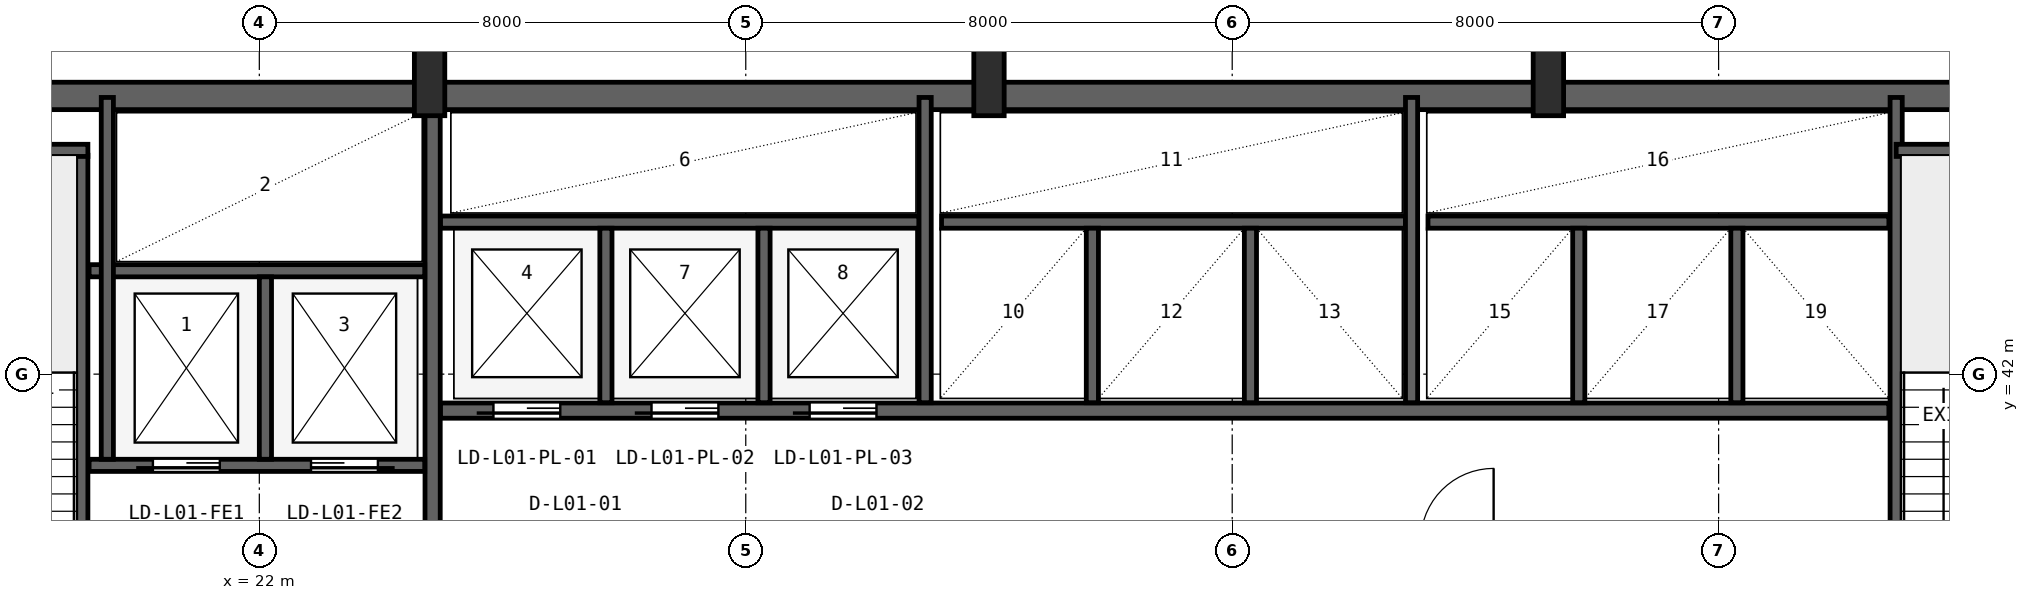
"""IFC4 building model, lengths in metres.
Left out: names, types, materials, properties, quantities, classifications, styles, units other than length and angle.
Written with IfcOpenShell. Run it as: python <this file> out.ifc"""

import sys

from ifc_helpers import new_model, si_unit, direction, frame, frame_2d, origin, origin_2d, place, context, subcontext, project, spatial, rectangle, i_section, extrude, source, transform, mapped, element, fill, save


model = new_model("IFC4")
c1 = context("Model", 3, precision=1e-05, world=origin(), true_north=direction((0.0, 1.0)))
c2 = subcontext(c1, "Body", "Model", "MODEL_VIEW")
j1 = project(units=[si_unit("LENGTHUNIT", "METRE"), si_unit("PLANEANGLEUNIT", "RADIAN")], contexts=[c1])
p1 = place(None, origin())
s1 = spatial("IfcSite", under=j1, at=p1, CompositionType="ELEMENT")
p2 = place(p1, origin())
s2 = spatial("IfcBuilding", under=s1, at=p2, CompositionType="ELEMENT")
p3 = place(p2, frame((0.0, 0.0, 6.0)))
s3 = spatial("IfcBuildingStorey", under=s2, at=p3, CompositionType="ELEMENT", Elevation=6.0)
p4 = place(p3, frame((15.6, 46.575, 0.0), z_axis=(0.0, 0.0, 1.0), x_axis=(1.0, 0.0, 0.0)))
e1 = element("IfcWall", 1, at=p4, inside=s3, PredefinedType="SHEAR", context=c2, shape_type="SweptSolid", body=[
    extrude(rectangle(XDim=36.8, YDim=0.45, at=frame_2d((18.4, 0.0))), origin(), (0.0, 0.0, 1.0), 5.12),
])
m1 = source(origin(), c2, "Body", "SweptSolid", [
    extrude(i_section(OverallWidth=0.5, OverallDepth=1.1, WebThickness=0.018, FlangeThickness=0.032, FilletRadius=0.018, at=origin_2d()), origin(), (0.0, 0.0, 1.0), 5.4),
])
for number, where, z_axis, x_axis in (
    (2, (24.8, 46.8, 0.0), (0.0, 0.0, 1.0), (1.0, 0.0, 0.0)),
    (3, (34.0, 46.8, 0.0), (0.0, 0.0, 1.0), (1.0, 0.0, 0.0)),
    (4, (43.2, 46.8, 0.0), (0.0, 0.0, 1.0), (1.0, 0.0, 0.0)),
):
    element("IfcColumn", number, at=place(p3, frame(where, z_axis=z_axis, x_axis=x_axis)), inside=s3, PredefinedType="COLUMN", context=c2, shape_type="MappedRepresentation", body=[
        mapped(m1, transform((0.0, 0.0, 0.0), x_axis=(1.0, 0.0, 0.0), y_axis=(0.0, 1.0, 0.0), z_axis=(0.0, 0.0, 1.0), scale=1.0)),
    ])
p5 = place(p3, frame((19.08, 35.95, 0.0), z_axis=(0.0, 0.0, 1.0), x_axis=(0.0, 1.0, 0.0)))
e5 = element("IfcWall", 5, at=p5, inside=s3, PredefinedType="SHEAR", context=c2, shape_type="SweptSolid", body=[
    extrude(rectangle(XDim=9.65, YDim=0.2, at=frame_2d((4.825, 0.0))), origin(), (0.0, 0.0, 1.0), 5.12),
])
p6 = place(p5, frame((0.25, 0.0, 0.0)))
e6 = element("IfcOpeningElement", 6, at=p6, cuts=e5, PredefinedType="OPENING", context=c2, shape_type="SweptSolid", body=[
    extrude(rectangle(XDim=0.95, YDim=2.1, at=frame_2d((0.475, 1.05))), frame((0.0, 0.11, 0.0), z_axis=(0.0, -1.0, 0.0), x_axis=(1.0, 0.0, 0.0)), (0.0, 0.0, 1.0), 0.22),
])
p7 = place(p3, frame((15.95, 45.68, 0.0), z_axis=(0.0, 0.0, 1.0), x_axis=(1.0, 0.0, 0.0)))
e7 = element("IfcWall", 7, at=p7, inside=s3, PredefinedType="SHEAR", context=c2, shape_type="SweptSolid", body=[
    extrude(rectangle(XDim=3.23, YDim=0.2, at=frame_2d((1.615, 0.0))), origin(), (0.0, 0.0, 1.0), 5.12),
])
p8 = place(p3, frame((24.85, 36.05, 0.0), z_axis=(0.0, 0.0, 1.0), x_axis=(0.0, 1.0, 0.0)))
e8 = element("IfcWall", 8, at=p8, inside=s3, PredefinedType="SHEAR", context=c2, shape_type="SweptSolid", body=[
    extrude(rectangle(XDim=10.45, YDim=0.25, at=frame_2d((5.225, 0.0))), origin(), (0.0, 0.0, 1.0), 5.12),
])
p9 = place(p3, frame((19.2, 40.5, 0.0), z_axis=(0.0, 0.0, 1.0), x_axis=(1.0, 0.0, 0.0)))
e9 = element("IfcWall", 9, at=p9, inside=s3, PredefinedType="SHEAR", context=c2, shape_type="SweptSolid", body=[
    extrude(rectangle(XDim=5.52, YDim=0.2, at=frame_2d((2.76, 0.0))), origin(), (0.0, 0.0, 1.0), 5.12),
])
p10 = place(p9, frame((1.05, 0.0, 0.0)))
e10 = element("IfcOpeningElement", 10, at=p10, cuts=e9, PredefinedType="OPENING", context=c2, shape_type="SweptSolid", body=[
    extrude(rectangle(XDim=1.1, YDim=2.18, at=frame_2d((0.55, 1.09))), frame((0.0, 0.11, 0.0), z_axis=(0.0, -1.0, 0.0), x_axis=(1.0, 0.0, 0.0)), (0.0, 0.0, 1.0), 0.22),
])
p11 = place(p9, frame((3.65, 0.0, 0.0)))
e11 = element("IfcOpeningElement", 11, at=p11, cuts=e9, PredefinedType="OPENING", context=c2, shape_type="SweptSolid", body=[
    extrude(rectangle(XDim=1.1, YDim=2.18, at=frame_2d((0.55, 1.09))), frame((0.0, 0.11, 0.0), z_axis=(0.0, -1.0, 0.0), x_axis=(1.0, 0.0, 0.0)), (0.0, 0.0, 1.0), 0.22),
])
p12 = place(p3, frame((19.2, 43.7, 0.0), z_axis=(0.0, 0.0, 1.0), x_axis=(1.0, 0.0, 0.0)))
e12 = element("IfcWall", 12, at=p12, inside=s3, PredefinedType="SHEAR", context=c2, shape_type="SweptSolid", body=[
    extrude(rectangle(XDim=5.52, YDim=0.2, at=frame_2d((2.76, 0.0))), origin(), (0.0, 0.0, 1.0), 5.12),
])
p13 = place(p3, frame((22.1, 40.6, 0.0), z_axis=(0.0, 0.0, 1.0), x_axis=(0.0, 1.0, 0.0)))
e13 = element("IfcWall", 13, at=p13, inside=s3, PredefinedType="SHEAR", context=c2, shape_type="SweptSolid", body=[
    extrude(rectangle(XDim=3.0, YDim=0.2, at=frame_2d((1.5, 0.0))), origin(), (0.0, 0.0, 1.0), 5.12),
])
p14 = place(p3, frame((19.5, 40.6, 0.0), z_axis=(0.0, 0.0, 1.0), x_axis=(0.0, 1.0, 0.0)))
e14 = element("IfcWall", 14, at=p14, inside=s3, PredefinedType="SHEAR", context=c2, shape_type="SweptSolid", body=[
    extrude(rectangle(XDim=5.95, YDim=0.2, at=frame_2d((2.975, 0.0))), origin(), (0.0, 0.0, 1.0), 5.12),
])
p15 = place(p3, frame((48.92, 36.05, 0.0), z_axis=(0.0, 0.0, 1.0), x_axis=(0.0, 1.0, 0.0)))
e15 = element("IfcWall", 15, at=p15, inside=s3, PredefinedType="SHEAR", context=c2, shape_type="SweptSolid", body=[
    extrude(rectangle(XDim=10.5, YDim=0.2, at=frame_2d((5.25, 0.0))), origin(), (0.0, 0.0, 1.0), 5.12),
])
p16 = place(p3, frame((48.92, 45.68, 0.0), z_axis=(0.0, 0.0, 1.0), x_axis=(1.0, 0.0, 0.0)))
e16 = element("IfcWall", 16, at=p16, inside=s3, PredefinedType="SHEAR", context=c2, shape_type="SweptSolid", body=[
    extrude(rectangle(XDim=3.18, YDim=0.2, at=frame_2d((1.59, 0.0))), origin(), (0.0, 0.0, 1.0), 5.12),
])
p17 = place(p3, frame((24.98, 41.4, 0.0), z_axis=(0.0, 0.0, 1.0), x_axis=(1.0, 0.0, 0.0)))
e17 = element("IfcWall", 17, at=p17, inside=s3, PredefinedType="SHEAR", context=c2, shape_type="SweptSolid", body=[
    extrude(rectangle(XDim=23.82, YDim=0.25, at=frame_2d((11.91, 0.0))), origin(), (0.0, 0.0, 1.0), 5.12),
])
p18 = place(p17, frame((0.87, 0.0, 0.0)))
e18 = element("IfcOpeningElement", 18, at=p18, cuts=e17, PredefinedType="OPENING", context=c2, shape_type="SweptSolid", body=[
    extrude(rectangle(XDim=1.1, YDim=2.18, at=frame_2d((0.55, 1.09))), frame((0.0, 0.135, 0.0), z_axis=(0.0, -1.0, 0.0), x_axis=(1.0, 0.0, 0.0)), (0.0, 0.0, 1.0), 0.27),
])
p19 = place(p17, frame((3.47, 0.0, 0.0)))
e19 = element("IfcOpeningElement", 19, at=p19, cuts=e17, PredefinedType="OPENING", context=c2, shape_type="SweptSolid", body=[
    extrude(rectangle(XDim=1.1, YDim=2.18, at=frame_2d((0.55, 1.09))), frame((0.0, 0.135, 0.0), z_axis=(0.0, -1.0, 0.0), x_axis=(1.0, 0.0, 0.0)), (0.0, 0.0, 1.0), 0.27),
])
p20 = place(p17, frame((6.07, 0.0, 0.0)))
e20 = element("IfcOpeningElement", 20, at=p20, cuts=e17, PredefinedType="OPENING", context=c2, shape_type="SweptSolid", body=[
    extrude(rectangle(XDim=1.1, YDim=2.18, at=frame_2d((0.55, 1.09))), frame((0.0, 0.135, 0.0), z_axis=(0.0, -1.0, 0.0), x_axis=(1.0, 0.0, 0.0)), (0.0, 0.0, 1.0), 0.27),
])
p21 = place(p3, frame((24.98, 44.5, 0.0), z_axis=(0.0, 0.0, 1.0), x_axis=(1.0, 0.0, 0.0)))
e21 = element("IfcWall", 21, at=p21, inside=s3, PredefinedType="SHEAR", context=c2, shape_type="SweptSolid", body=[
    extrude(rectangle(XDim=7.87, YDim=0.2, at=frame_2d((3.935, 0.0))), origin(), (0.0, 0.0, 1.0), 5.12),
])
for number, where, z_axis, x_axis in (
    (22, (27.7, 41.53, 0.0), (0.0, 0.0, 1.0), (0.0, 1.0, 0.0)),
    (23, (30.3, 41.53, 0.0), (0.0, 0.0, 1.0), (0.0, 1.0, 0.0)),
):
    element("IfcWall", number, at=place(p3, frame(where, z_axis=z_axis, x_axis=x_axis)), inside=s3, PredefinedType="SHEAR", context=c2, shape_type="SweptSolid", body=[
        extrude(rectangle(XDim=2.87, YDim=0.2, at=frame_2d((1.435, 0.0))), origin(), (0.0, 0.0, 1.0), 5.12),
    ])
p22 = place(p3, frame((32.95, 41.53, 0.0), z_axis=(0.0, 0.0, 1.0), x_axis=(0.0, 1.0, 0.0)))
e24 = element("IfcWall", 24, at=p22, inside=s3, PredefinedType="SHEAR", context=c2, shape_type="SweptSolid", body=[
    extrude(rectangle(XDim=5.02, YDim=0.2, at=frame_2d((2.51, 0.0))), origin(), (0.0, 0.0, 1.0), 5.12),
])
p23 = place(p3, frame((33.22, 44.5, 0.0), z_axis=(0.0, 0.0, 1.0), x_axis=(1.0, 0.0, 0.0)))
e25 = element("IfcWall", 25, at=p23, inside=s3, PredefinedType="SHEAR", context=c2, shape_type="SweptSolid", body=[
    extrude(rectangle(XDim=7.63, YDim=0.2, at=frame_2d((3.815, 0.0))), origin(), (0.0, 0.0, 1.0), 5.12),
])
for number, where, z_axis, x_axis in (
    (26, (35.7, 41.53, 0.0), (0.0, 0.0, 1.0), (0.0, 1.0, 0.0)),
    (27, (38.3, 41.53, 0.0), (0.0, 0.0, 1.0), (0.0, 1.0, 0.0)),
):
    element("IfcWall", number, at=place(p3, frame(where, z_axis=z_axis, x_axis=x_axis)), inside=s3, PredefinedType="SHEAR", context=c2, shape_type="SweptSolid", body=[
        extrude(rectangle(XDim=2.87, YDim=0.2, at=frame_2d((1.435, 0.0))), origin(), (0.0, 0.0, 1.0), 5.12),
    ])
p24 = place(p3, frame((40.95, 41.53, 0.0), z_axis=(0.0, 0.0, 1.0), x_axis=(0.0, 1.0, 0.0)))
e28 = element("IfcWall", 28, at=p24, inside=s3, PredefinedType="SHEAR", context=c2, shape_type="SweptSolid", body=[
    extrude(rectangle(XDim=5.02, YDim=0.2, at=frame_2d((2.51, 0.0))), origin(), (0.0, 0.0, 1.0), 5.12),
])
p25 = place(p3, frame((41.22, 44.5, 0.0), z_axis=(0.0, 0.0, 1.0), x_axis=(1.0, 0.0, 0.0)))
e29 = element("IfcWall", 29, at=p25, inside=s3, PredefinedType="SHEAR", context=c2, shape_type="SweptSolid", body=[
    extrude(rectangle(XDim=7.58, YDim=0.2, at=frame_2d((3.79, 0.0))), origin(), (0.0, 0.0, 1.0), 5.12),
])
for number, where, z_axis, x_axis in (
    (30, (43.7, 41.53, 0.0), (0.0, 0.0, 1.0), (0.0, 1.0, 0.0)),
    (31, (46.3, 41.53, 0.0), (0.0, 0.0, 1.0), (0.0, 1.0, 0.0)),
):
    element("IfcWall", number, at=place(p3, frame(where, z_axis=z_axis, x_axis=x_axis)), inside=s3, PredefinedType="SHEAR", context=c2, shape_type="SweptSolid", body=[
        extrude(rectangle(XDim=2.87, YDim=0.2, at=frame_2d((1.435, 0.0))), origin(), (0.0, 0.0, 1.0), 5.12),
    ])
m2 = source(origin(), c2, "Body", "SweptSolid", [
    extrude(rectangle(XDim=1.1, YDim=2.18, at=frame_2d((0.55, 1.09))), frame((0.0, 0.025, 0.0), z_axis=(0.0, -1.0, 0.0), x_axis=(1.0, 0.0, 0.0)), (0.0, 0.0, 1.0), 0.05),
])
p26 = place(p10, frame((1.1, 0.0, 0.0), z_axis=(0.0, 0.0, 1.0), x_axis=(-1.0, 0.0, 0.0)))
e32 = element("IfcDoor", 32, at=p26, inside=s3, OperationType="SLIDING_TO_LEFT", PredefinedType="DOOR", context=c2, shape_type="MappedRepresentation", body=[
    mapped(m2, transform((0.0, 0.0, 0.0), x_axis=(1.0, 0.0, 0.0), y_axis=(0.0, 1.0, 0.0), z_axis=(0.0, 0.0, 1.0), scale=1.0)),
])
fill(e10, e32)
p27 = place(p11, frame((1.1, 0.0, 0.0), z_axis=(0.0, 0.0, 1.0), x_axis=(-1.0, 0.0, 0.0)))
e33 = element("IfcDoor", 33, at=p27, inside=s3, OperationType="SLIDING_TO_RIGHT", PredefinedType="DOOR", context=c2, shape_type="MappedRepresentation", body=[
    mapped(m2, transform((0.0, 0.0, 0.0), x_axis=(1.0, 0.0, 0.0), y_axis=(0.0, 1.0, 0.0), z_axis=(0.0, 0.0, 1.0), scale=1.0)),
])
fill(e11, e33)
p28 = place(p18, frame((1.1, 0.0, 0.0), z_axis=(0.0, 0.0, 1.0), x_axis=(-1.0, 0.0, 0.0)))
e34 = element("IfcDoor", 34, at=p28, inside=s3, OperationType="SLIDING_TO_LEFT", PredefinedType="DOOR", context=c2, shape_type="MappedRepresentation", body=[
    mapped(m2, transform((0.0, 0.0, 0.0), x_axis=(1.0, 0.0, 0.0), y_axis=(0.0, 1.0, 0.0), z_axis=(0.0, 0.0, 1.0), scale=1.0)),
])
fill(e18, e34)
p29 = place(p19, frame((1.1, 0.0, 0.0), z_axis=(0.0, 0.0, 1.0), x_axis=(-1.0, 0.0, 0.0)))
e35 = element("IfcDoor", 35, at=p29, inside=s3, OperationType="SLIDING_TO_LEFT", PredefinedType="DOOR", context=c2, shape_type="MappedRepresentation", body=[
    mapped(m2, transform((0.0, 0.0, 0.0), x_axis=(1.0, 0.0, 0.0), y_axis=(0.0, 1.0, 0.0), z_axis=(0.0, 0.0, 1.0), scale=1.0)),
])
fill(e19, e35)
p30 = place(p20, frame((1.1, 0.0, 0.0), z_axis=(0.0, 0.0, 1.0), x_axis=(-1.0, 0.0, 0.0)))
e36 = element("IfcDoor", 36, at=p30, inside=s3, OperationType="SLIDING_TO_LEFT", PredefinedType="DOOR", context=c2, shape_type="MappedRepresentation", body=[
    mapped(m2, transform((0.0, 0.0, 0.0), x_axis=(1.0, 0.0, 0.0), y_axis=(0.0, 1.0, 0.0), z_axis=(0.0, 0.0, 1.0), scale=1.0)),
])
fill(e20, e36)
save(model, sys.argv[1])
